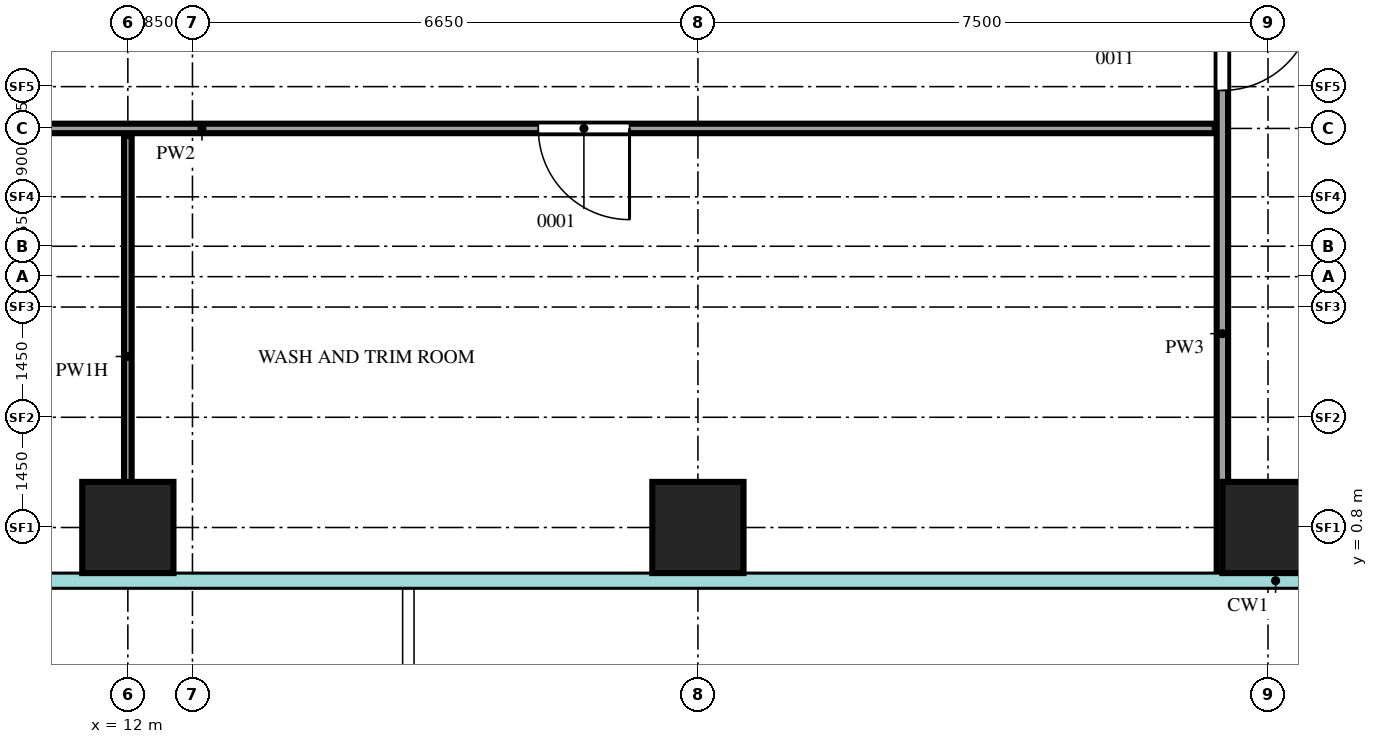
"""IFC4 building model, lengths in metres.
Left out: names, types, materials, properties, quantities, classifications, styles, units other than length and angle.
Written with IfcOpenShell. Run it as: python <this file> out.ifc"""

import sys

from ifc_helpers import new_model, si_unit, direction, frame, frame_2d, origin, origin_2d, place, context, subcontext, project, spatial, rectangle, extrude, source, transform, mapped, element, fill, save


model = new_model("IFC4")
c1 = context("Model", 3, precision=1e-05, world=origin(), true_north=direction((0.0, 1.0)))
c2 = subcontext(c1, "Body", "Model", "MODEL_VIEW")
j1 = project(units=[si_unit("LENGTHUNIT", "METRE"), si_unit("PLANEANGLEUNIT", "RADIAN")], contexts=[c1])
p1 = place(None, origin())
s1 = spatial("IfcSite", under=j1, at=p1, CompositionType="ELEMENT")
p2 = place(p1, origin())
s2 = spatial("IfcBuilding", under=s1, at=p2, CompositionType="ELEMENT")
p3 = place(p2, frame((0.0, 0.0, 37.5)))
s3 = spatial("IfcBuildingStorey", under=s2, at=p3, CompositionType="ELEMENT", Elevation=37.5)
m1 = source(origin(), c2, "Body", "SweptSolid", [
    extrude(rectangle(XDim=1.2, YDim=1.2, at=origin_2d()), origin(), (0.0, 0.0, 1.0), 4.2),
])
for number, where, z_axis, x_axis in (
    (1, (12.0, 0.8, 0.0), (0.0, 0.0, 1.0), (1.0, 0.0, 0.0)),
    (2, (19.5, 0.8, 0.0), (0.0, 0.0, 1.0), (1.0, 0.0, 0.0)),
    (3, (27.0, 0.8, 0.0), (0.0, 0.0, 1.0), (1.0, 0.0, 0.0)),
):
    element("IfcColumn", number, at=place(p3, frame(where, z_axis=z_axis, x_axis=x_axis)), inside=s3, PredefinedType="COLUMN", context=c2, shape_type="MappedRepresentation", body=[
        mapped(m1, transform((0.0, 0.0, 0.0))),
    ])
m2 = source(origin(), c2, "Body", "SweptSolid", [
    extrude(rectangle(XDim=5.8, YDim=0.1, at=frame_2d((2.9, 0.0))), origin(), (0.0, 0.0, 1.0), 3.7),
])
p4 = place(p3, frame((12.0, 0.15, 0.0), z_axis=(0.0, 0.0, 1.0), x_axis=(0.0, 1.0, 0.0)))
e4 = element("IfcWall", 4, at=p4, inside=s3, PredefinedType="PARTITIONING", context=c2, shape_type="MappedRepresentation", body=[
    mapped(m2, transform((0.0, 0.0, 0.0))),
])
m3 = source(origin(), c2, "Body", "SweptSolid", [
    extrude(rectangle(XDim=7.75, YDim=0.15, at=frame_2d((3.875, 0.0))), origin(), (0.0, 0.0, 1.0), 4.3),
])
p5 = place(p3, frame((26.4, 0.15, 0.0), z_axis=(0.0, 0.0, 1.0), x_axis=(0.0, 1.0, 0.0)))
e5 = element("IfcWall", 5, at=p5, inside=s3, PredefinedType="PARTITIONING", context=c2, shape_type="MappedRepresentation", body=[
    mapped(m3, transform((0.0, 0.0, 0.0))),
])
m4 = source(origin(), c2, "Body", "SweptSolid", [
    extrude(rectangle(XDim=1.2, YDim=2.1, at=frame_2d((0.6, 1.05))), frame((0.0, 0.085, 0.0), z_axis=(0.0, -1.0, 0.0), x_axis=(1.0, 0.0, 0.0)), (0.0, 0.0, 1.0), 0.17),
])
p6 = place(p5, frame((6.4, 0.0, 0.0)))
e6 = element("IfcOpeningElement", 6, at=p6, cuts=e5, PredefinedType="OPENING", context=c2, shape_type="MappedRepresentation", body=[
    mapped(m4, transform((0.0, 0.0, 0.0))),
])
m5 = source(origin(), c2, "Body", "SweptSolid", [
    extrude(rectangle(XDim=22.15, YDim=0.125, at=frame_2d((11.075, 0.0))), origin(), (0.0, 0.0, 1.0), 4.3),
])
p7 = place(p3, frame((4.15, 6.05, 0.0), z_axis=(0.0, 0.0, 1.0), x_axis=(1.0, 0.0, 0.0)))
e7 = element("IfcWall", 7, at=p7, inside=s3, PredefinedType="PARTITIONING", context=c2, shape_type="MappedRepresentation", body=[
    mapped(m5, transform((0.0, 0.0, 0.0))),
])
m6 = source(origin(), c2, "Body", "SweptSolid", [
    extrude(rectangle(XDim=0.9, YDim=2.1, at=frame_2d((0.45, 1.05))), frame((0.0, 0.073, 0.0), z_axis=(0.0, -1.0, 0.0), x_axis=(1.0, 0.0, 0.0)), (0.0, 0.0, 1.0), 0.145),
])
p8 = place(p7, frame((3.5, 0.0, 0.0)))
e8 = element("IfcOpeningElement", 8, at=p8, cuts=e7, PredefinedType="OPENING", context=c2, shape_type="MappedRepresentation", body=[
    mapped(m6, transform((0.0, 0.0, 0.0))),
])
m7 = source(origin(), c2, "Body", "SweptSolid", [
    extrude(rectangle(XDim=1.2, YDim=2.1, at=frame_2d((0.6, 1.05))), frame((0.0, 0.073, 0.0), z_axis=(0.0, -1.0, 0.0), x_axis=(1.0, 0.0, 0.0)), (0.0, 0.0, 1.0), 0.145),
])
p9 = place(p7, frame((13.25, 0.0, 0.0)))
e9 = element("IfcOpeningElement", 9, at=p9, cuts=e7, PredefinedType="OPENING", context=c2, shape_type="MappedRepresentation", body=[
    mapped(m7, transform((0.0, 0.0, 0.0))),
])
m8 = source(origin(), c2, "Body", "SweptSolid", [
    extrude(rectangle(XDim=1.2, YDim=2.1, at=frame_2d((0.6, 1.05))), frame((0.0, 0.025, 0.0), z_axis=(0.0, -1.0, 0.0), x_axis=(1.0, 0.0, 0.0)), (0.0, 0.0, 1.0), 0.05),
])
p10 = place(p6, origin())
e10 = element("IfcDoor", 10, at=p10, inside=s3, OperationType="SINGLE_SWING_RIGHT", PredefinedType="DOOR", context=c2, shape_type="MappedRepresentation", body=[
    mapped(m8, transform((0.0, 0.0, 0.0))),
])
fill(e6, e10)
p11 = place(p9, origin())
e11 = element("IfcDoor", 11, at=p11, inside=s3, OperationType="SINGLE_SWING_RIGHT", PredefinedType="DOOR", context=c2, shape_type="MappedRepresentation", body=[
    mapped(m8, transform((0.0, 0.0, 0.0))),
])
fill(e9, e11)
save(model, sys.argv[1])
